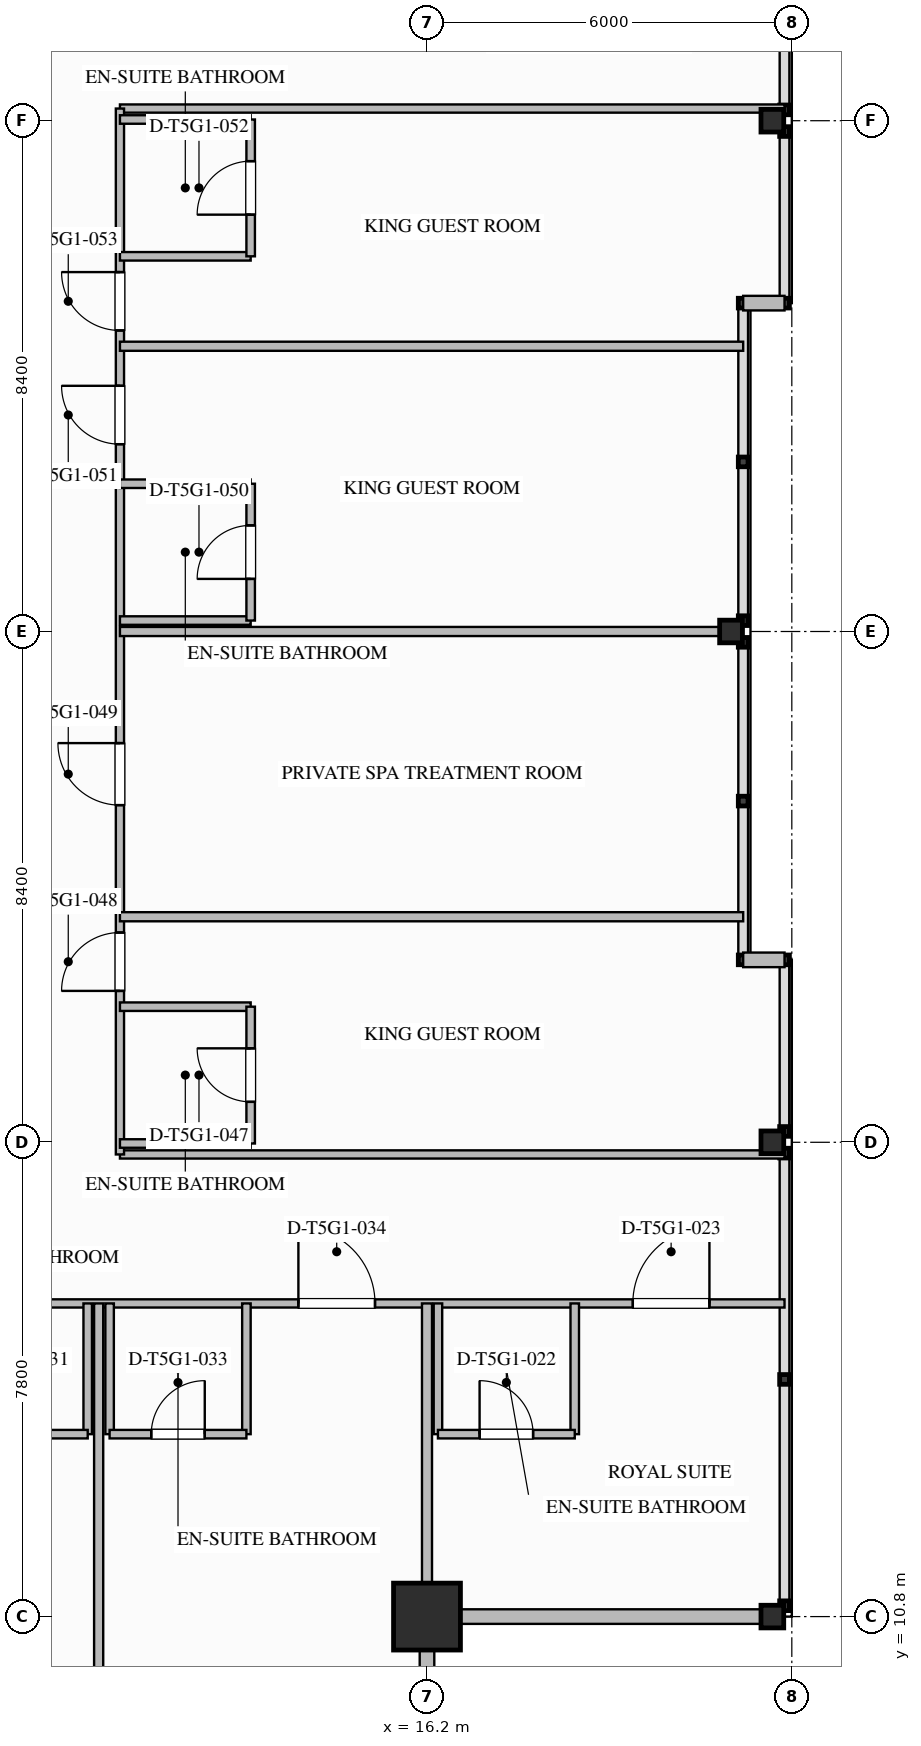
"""IFC4 building model, lengths in metres.
Left out: names, types, materials, properties, quantities, classifications, styles, units other than length and angle.
Written with IfcOpenShell. Run it as: python <this file> out.ifc"""

import sys

from ifc_helpers import new_model, si_unit, direction, frame, frame_2d, origin, origin_2d, place, context, subcontext, project, spatial, rectangle, i_section, extrude, element, fill, save


model = new_model("IFC4")
c1 = context("Model", 3, precision=1e-05, world=origin(), true_north=direction((0.0, 1.0)))
c2 = subcontext(c1, "Body", "Model", "MODEL_VIEW")
j1 = project(units=[si_unit("LENGTHUNIT", "METRE"), si_unit("PLANEANGLEUNIT", "RADIAN")], contexts=[c1])
p1 = place(None, origin())
s1 = spatial("IfcSite", under=j1, at=p1, CompositionType="ELEMENT")
p2 = place(p1, origin())
s2 = spatial("IfcBuilding", under=s1, at=p2, CompositionType="ELEMENT")
p3 = place(p2, frame((0.0, 0.0, 268.65)))
s3 = spatial("IfcBuildingStorey", under=s2, at=p3, CompositionType="ELEMENT", Elevation=268.65)
p4 = place(p3, frame((16.2, 10.8, 0.0), z_axis=(0.0, 0.0, 1.0), x_axis=(1.0, 0.0, 0.0)))
e1 = element("IfcColumn", 1, at=p4, inside=s3, PredefinedType="COLUMN", context=c2, shape_type="SweptSolid", body=[
    extrude(rectangle(XDim=1.1, YDim=1.1, at=origin_2d()), origin(), (0.0, 0.0, 1.0), 3.65),
])
for number, where, z_axis, x_axis in (
    (2, (21.88, 10.8, 0.0), (0.0, 0.0, 1.0), (1.0, 0.0, 0.0)),
    (3, (21.88, 18.6, 0.0), (0.0, 0.0, 1.0), (1.0, 0.0, 0.0)),
    (4, (21.2, 27.0, 0.0), (0.0, 0.0, 1.0), (1.0, 0.0, 0.0)),
    (5, (21.88, 35.4, 0.0), (0.0, 0.0, 1.0), (1.0, 0.0, 0.0)),
):
    element("IfcColumn", number, at=place(p3, frame(where, z_axis=z_axis, x_axis=x_axis)), inside=s3, PredefinedType="COLUMN", context=c2, shape_type="SweptSolid", body=[
        extrude(i_section(OverallWidth=0.374, OverallDepth=0.372, WebThickness=0.016, FlangeThickness=0.026, FilletRadius=0.025, at=origin_2d()), origin(), (0.0, 0.0, 1.0), 3.647),
    ])
for number, where, z_axis, x_axis in (
    (6, (22.08, 10.8, 0.0), (0.0, 0.0, 1.0), (-1.0, 0.0, 0.0)),
    (7, (16.2, 10.8, 0.0), (0.0, 0.0, 1.0), (0.0, -1.0, 0.0)),
):
    element("IfcWall", number, at=place(p3, frame(where, z_axis=z_axis, x_axis=x_axis)), inside=s3, PredefinedType="STANDARD", context=c2, shape_type="SweptSolid", body=[
        extrude(rectangle(XDim=5.88, YDim=0.24, at=frame_2d((2.94, 0.0))), origin(), (0.0, 0.0, 1.0), 2.779),
    ])
for number, where, z_axis, x_axis in (
    (8, (22.08, 32.4, 0.0), (0.0, 0.0, 1.0), (-1.0, 0.0, 0.0)),
    (9, (21.4, 21.6, 0.0), (0.0, 0.0, 1.0), (1.0, 0.0, 0.0)),
):
    element("IfcWall", number, at=place(p3, frame(where, z_axis=z_axis, x_axis=x_axis)), inside=s3, PredefinedType="STANDARD", context=c2, shape_type="SweptSolid", body=[
        extrude(rectangle(XDim=0.68, YDim=0.24, at=frame_2d((0.34, 0.0))), origin(), (0.0, 0.0, 1.0), 3.39),
    ])
p5 = place(p3, frame((-16.2, 15.95, 0.0), z_axis=(0.0, 0.0, 1.0), x_axis=(1.0, 0.0, 0.0)))
e10 = element("IfcWall", 10, at=p5, inside=s3, PredefinedType="PARTITIONING", context=c2, shape_type="SweptSolid", body=[
    extrude(rectangle(XDim=38.28, YDim=0.135, at=frame_2d((19.14, 0.0))), origin(), (0.0, 0.0, 1.0), 3.39),
])
p6 = place(p5, frame((35.785, 0.0, 0.0)))
e11 = element("IfcOpeningElement", 11, at=p6, cuts=e10, PredefinedType="OPENING", context=c2, shape_type="SweptSolid", body=[
    extrude(rectangle(XDim=1.26, YDim=2.2, at=frame_2d((0.63, 1.1))), frame((0.0, 0.077, 0.0), z_axis=(0.0, -1.0, 0.0), x_axis=(1.0, 0.0, 0.0)), (0.0, 0.0, 1.0), 0.155),
])
p7 = place(p5, frame((3.285, 0.0, 0.0)))
e12 = element("IfcOpeningElement", 12, at=p7, cuts=e10, PredefinedType="OPENING", context=c2, shape_type="SweptSolid", body=[
    extrude(rectangle(XDim=1.26, YDim=2.2, at=frame_2d((0.63, 1.1))), frame((0.0, 0.077, 0.0), z_axis=(0.0, -1.0, 0.0), x_axis=(1.0, 0.0, 0.0)), (0.0, 0.0, 1.0), 0.155),
])
p8 = place(p5, frame((7.335, 0.0, 0.0)))
e13 = element("IfcOpeningElement", 13, at=p8, cuts=e10, PredefinedType="OPENING", context=c2, shape_type="SweptSolid", body=[
    extrude(rectangle(XDim=1.26, YDim=2.2, at=frame_2d((0.63, 1.1))), frame((0.0, 0.077, 0.0), z_axis=(0.0, -1.0, 0.0), x_axis=(1.0, 0.0, 0.0)), (0.0, 0.0, 1.0), 0.155),
])
p9 = place(p5, frame((15.69, 0.0, 0.0)))
e14 = element("IfcOpeningElement", 14, at=p9, cuts=e10, PredefinedType="OPENING", context=c2, shape_type="SweptSolid", body=[
    extrude(rectangle(XDim=1.02, YDim=2.15, at=frame_2d((0.51, 1.075))), frame((0.0, 0.077, 0.0), z_axis=(0.0, -1.0, 0.0), x_axis=(1.0, 0.0, 0.0)), (0.0, 0.0, 1.0), 0.155),
])
p10 = place(p5, frame((21.375, 0.0, 0.0)))
e15 = element("IfcOpeningElement", 15, at=p10, cuts=e10, PredefinedType="OPENING", context=c2, shape_type="SweptSolid", body=[
    extrude(rectangle(XDim=1.26, YDim=2.2, at=frame_2d((0.63, 1.1))), frame((0.0, 0.077, 0.0), z_axis=(0.0, -1.0, 0.0), x_axis=(1.0, 0.0, 0.0)), (0.0, 0.0, 1.0), 0.155),
])
p11 = place(p5, frame((30.285, 0.0, 0.0)))
e16 = element("IfcOpeningElement", 16, at=p11, cuts=e10, PredefinedType="OPENING", context=c2, shape_type="SweptSolid", body=[
    extrude(rectangle(XDim=1.26, YDim=2.2, at=frame_2d((0.63, 1.1))), frame((0.0, 0.077, 0.0), z_axis=(0.0, -1.0, 0.0), x_axis=(1.0, 0.0, 0.0)), (0.0, 0.0, 1.0), 0.155),
])
for number, where, z_axis, x_axis in (
    (17, (11.15, 18.4, 0.0), (0.0, 0.0, 1.0), (1.0, 0.0, 0.0)),
    (18, (11.15, 35.6, 0.0), (0.0, 0.0, 1.0), (1.0, 0.0, 0.0)),
):
    element("IfcWall", number, at=place(p3, frame(where, z_axis=z_axis, x_axis=x_axis)), inside=s3, PredefinedType="PARTITIONING", context=c2, shape_type="SweptSolid", body=[
        extrude(rectangle(XDim=10.93, YDim=0.135, at=frame_2d((5.465, 0.0))), origin(), (0.0, 0.0, 1.0), 2.768),
    ])
p12 = place(p3, frame((11.15, 18.4, 0.0), z_axis=(0.0, 0.0, 1.0), x_axis=(0.0, 1.0, 0.0)))
e19 = element("IfcWall", 19, at=p12, inside=s3, PredefinedType="PARTITIONING", context=c2, shape_type="SweptSolid", body=[
    extrude(rectangle(XDim=17.2, YDim=0.135, at=frame_2d((8.6, 0.0))), origin(), (0.0, 0.0, 1.0), 3.39),
])
p13 = place(p12, frame((2.689, 0.0, 0.0)))
e20 = element("IfcOpeningElement", 20, at=p13, cuts=e19, PredefinedType="OPENING", context=c2, shape_type="SweptSolid", body=[
    extrude(rectangle(XDim=0.96, YDim=2.15, at=frame_2d((0.48, 1.075))), frame((0.0, 0.077, 0.0), z_axis=(0.0, -1.0, 0.0), x_axis=(1.0, 0.0, 0.0)), (0.0, 0.0, 1.0), 0.155),
])
p14 = place(p12, frame((5.745, 0.0, 0.0)))
e21 = element("IfcOpeningElement", 21, at=p14, cuts=e19, PredefinedType="OPENING", context=c2, shape_type="SweptSolid", body=[
    extrude(rectangle(XDim=1.02, YDim=2.15, at=frame_2d((0.51, 1.075))), frame((0.0, 0.077, 0.0), z_axis=(0.0, -1.0, 0.0), x_axis=(1.0, 0.0, 0.0)), (0.0, 0.0, 1.0), 0.155),
])
p15 = place(p12, frame((11.68, 0.0, 0.0)))
e22 = element("IfcOpeningElement", 22, at=p15, cuts=e19, PredefinedType="OPENING", context=c2, shape_type="SweptSolid", body=[
    extrude(rectangle(XDim=0.96, YDim=2.15, at=frame_2d((0.48, 1.075))), frame((0.0, 0.077, 0.0), z_axis=(0.0, -1.0, 0.0), x_axis=(1.0, 0.0, 0.0)), (0.0, 0.0, 1.0), 0.155),
])
p16 = place(p12, frame((13.551, 0.0, 0.0)))
e23 = element("IfcOpeningElement", 23, at=p16, cuts=e19, PredefinedType="OPENING", context=c2, shape_type="SweptSolid", body=[
    extrude(rectangle(XDim=0.96, YDim=2.15, at=frame_2d((0.48, 1.075))), frame((0.0, 0.077, 0.0), z_axis=(0.0, -1.0, 0.0), x_axis=(1.0, 0.0, 0.0)), (0.0, 0.0, 1.0), 0.155),
])
p17 = place(p3, frame((16.2, 10.92, 0.0), z_axis=(0.0, 0.0, 1.0), x_axis=(0.0, 1.0, 0.0)))
e24 = element("IfcWall", 24, at=p17, inside=s3, PredefinedType="PARTITIONING", context=c2, shape_type="SweptSolid", body=[
    extrude(rectangle(XDim=5.03, YDim=0.165, at=frame_2d((2.515, 0.0))), origin(), (0.0, 0.0, 1.0), 2.764),
])
p18 = place(p3, frame((16.38, 15.95, 0.0), z_axis=(0.0, 0.0, 1.0), x_axis=(0.0, -1.0, 0.0)))
e25 = element("IfcWall", 25, at=p18, inside=s3, PredefinedType="PLUMBINGWALL", context=c2, shape_type="SweptSolid", body=[
    extrude(rectangle(XDim=2.15, YDim=0.14, at=frame_2d((1.075, 0.0))), origin(), (0.0, 0.0, 1.0), 2.764),
])
p19 = place(p3, frame((18.63, 15.95, 0.0), z_axis=(0.0, 0.0, 1.0), x_axis=(0.0, -1.0, 0.0)))
e26 = element("IfcWall", 26, at=p19, inside=s3, PredefinedType="PLUMBINGWALL", context=c2, shape_type="SweptSolid", body=[
    extrude(rectangle(XDim=2.15, YDim=0.14, at=frame_2d((1.075, 0.0))), origin(), (0.0, 0.0, 1.0), 3.39),
])
p20 = place(p3, frame((16.38, 13.8, 0.0), z_axis=(0.0, 0.0, 1.0), x_axis=(1.0, 0.0, 0.0)))
e27 = element("IfcWall", 27, at=p20, inside=s3, PredefinedType="PLUMBINGWALL", context=c2, shape_type="SweptSolid", body=[
    extrude(rectangle(XDim=2.25, YDim=0.14, at=frame_2d((1.125, 0.0))), origin(), (0.0, 0.0, 1.0), 3.39),
])
p21 = place(p20, frame((0.685, 0.0, 0.0)))
e28 = element("IfcOpeningElement", 28, at=p21, cuts=e27, PredefinedType="OPENING", context=c2, shape_type="SweptSolid", body=[
    extrude(rectangle(XDim=0.88, YDim=2.1, at=frame_2d((0.44, 1.05))), frame((0.0, 0.08, 0.0), z_axis=(0.0, -1.0, 0.0), x_axis=(1.0, 0.0, 0.0)), (0.0, 0.0, 1.0), 0.16),
])
p22 = place(p3, frame((10.62, 15.95, 0.0), z_axis=(0.0, 0.0, 1.0), x_axis=(0.0, -1.0, 0.0)))
e29 = element("IfcWall", 29, at=p22, inside=s3, PredefinedType="PLUMBINGWALL", context=c2, shape_type="SweptSolid", body=[
    extrude(rectangle(XDim=2.15, YDim=0.14, at=frame_2d((1.075, 0.0))), origin(), (0.0, 0.0, 1.0), 3.39),
])
p23 = place(p3, frame((8.37, 13.8, 0.0), z_axis=(0.0, 0.0, 1.0), x_axis=(1.0, 0.0, 0.0)))
e30 = element("IfcWall", 30, at=p23, inside=s3, PredefinedType="PLUMBINGWALL", context=c2, shape_type="SweptSolid", body=[
    extrude(rectangle(XDim=2.25, YDim=0.14, at=frame_2d((1.125, 0.0))), origin(), (0.0, 0.0, 1.0), 3.39),
])
p24 = place(p23, frame((0.685, 0.0, 0.0)))
e31 = element("IfcOpeningElement", 31, at=p24, cuts=e30, PredefinedType="OPENING", context=c2, shape_type="SweptSolid", body=[
    extrude(rectangle(XDim=0.88, YDim=2.1, at=frame_2d((0.44, 1.05))), frame((0.0, 0.08, 0.0), z_axis=(0.0, -1.0, 0.0), x_axis=(1.0, 0.0, 0.0)), (0.0, 0.0, 1.0), 0.16),
])
p25 = place(p3, frame((10.8, 4.92, 0.0), z_axis=(0.0, 0.0, 1.0), x_axis=(0.0, 1.0, 0.0)))
e32 = element("IfcWall", 32, at=p25, inside=s3, PredefinedType="PARTITIONING", context=c2, shape_type="SweptSolid", body=[
    extrude(rectangle(XDim=11.03, YDim=0.15, at=frame_2d((5.515, 0.0))), origin(), (0.0, 0.0, 1.0), 3.39),
])
for number, where, z_axis, x_axis in (
    (33, (10.98, 15.95, 0.0), (0.0, 0.0, 1.0), (0.0, -1.0, 0.0)),
    (34, (13.23, 15.95, 0.0), (0.0, 0.0, 1.0), (0.0, -1.0, 0.0)),
):
    element("IfcWall", number, at=place(p3, frame(where, z_axis=z_axis, x_axis=x_axis)), inside=s3, PredefinedType="PLUMBINGWALL", context=c2, shape_type="SweptSolid", body=[
        extrude(rectangle(XDim=2.15, YDim=0.14, at=frame_2d((1.075, 0.0))), origin(), (0.0, 0.0, 1.0), 3.39),
    ])
p26 = place(p3, frame((10.98, 13.8, 0.0), z_axis=(0.0, 0.0, 1.0), x_axis=(1.0, 0.0, 0.0)))
e35 = element("IfcWall", 35, at=p26, inside=s3, PredefinedType="PLUMBINGWALL", context=c2, shape_type="SweptSolid", body=[
    extrude(rectangle(XDim=2.25, YDim=0.14, at=frame_2d((1.125, 0.0))), origin(), (0.0, 0.0, 1.0), 3.39),
])
p27 = place(p26, frame((0.685, 0.0, 0.0)))
e36 = element("IfcOpeningElement", 36, at=p27, cuts=e35, PredefinedType="OPENING", context=c2, shape_type="SweptSolid", body=[
    extrude(rectangle(XDim=0.88, YDim=2.1, at=frame_2d((0.44, 1.05))), frame((0.0, 0.08, 0.0), z_axis=(0.0, -1.0, 0.0), x_axis=(1.0, 0.0, 0.0)), (0.0, 0.0, 1.0), 0.16),
])
p28 = place(p3, frame((11.15, 18.58, 0.0), z_axis=(0.0, 0.0, 1.0), x_axis=(1.0, 0.0, 0.0)))
e37 = element("IfcWall", 37, at=p28, inside=s3, PredefinedType="PLUMBINGWALL", context=c2, shape_type="SweptSolid", body=[
    extrude(rectangle(XDim=2.15, YDim=0.14, at=frame_2d((1.075, 0.0))), origin(), (0.0, 0.0, 1.0), 2.768),
])
p29 = place(p3, frame((11.15, 20.83, 0.0), z_axis=(0.0, 0.0, 1.0), x_axis=(1.0, 0.0, 0.0)))
e38 = element("IfcWall", 38, at=p29, inside=s3, PredefinedType="PLUMBINGWALL", context=c2, shape_type="SweptSolid", body=[
    extrude(rectangle(XDim=2.15, YDim=0.14, at=frame_2d((1.075, 0.0))), origin(), (0.0, 0.0, 1.0), 3.39),
])
p30 = place(p3, frame((13.3, 18.58, 0.0), z_axis=(0.0, 0.0, 1.0), x_axis=(0.0, 1.0, 0.0)))
e39 = element("IfcWall", 39, at=p30, inside=s3, PredefinedType="PLUMBINGWALL", context=c2, shape_type="SweptSolid", body=[
    extrude(rectangle(XDim=2.25, YDim=0.14, at=frame_2d((1.125, 0.0))), origin(), (0.0, 0.0, 1.0), 3.39),
])
p31 = place(p30, frame((0.685, 0.0, 0.0)))
e40 = element("IfcOpeningElement", 40, at=p31, cuts=e39, PredefinedType="OPENING", context=c2, shape_type="SweptSolid", body=[
    extrude(rectangle(XDim=0.88, YDim=2.1, at=frame_2d((0.44, 1.05))), frame((0.0, 0.08, 0.0), z_axis=(0.0, -1.0, 0.0), x_axis=(1.0, 0.0, 0.0)), (0.0, 0.0, 1.0), 0.16),
])
p32 = place(p3, frame((11.15, 22.309, 0.0), z_axis=(0.0, 0.0, 1.0), x_axis=(1.0, 0.0, 0.0)))
e41 = element("IfcWall", 41, at=p32, inside=s3, PredefinedType="PARTITIONING", context=c2, shape_type="SweptSolid", body=[
    extrude(rectangle(XDim=10.25, YDim=0.15, at=frame_2d((5.125, 0.0))), origin(), (0.0, 0.0, 1.0), 3.39),
])
p33 = place(p3, frame((11.15, 27.0, 0.0), z_axis=(0.0, 0.0, 1.0), x_axis=(1.0, 0.0, 0.0)))
e42 = element("IfcWall", 42, at=p33, inside=s3, PredefinedType="PARTITIONING", context=c2, shape_type="SweptSolid", body=[
    extrude(rectangle(XDim=10.25, YDim=0.15, at=frame_2d((5.125, 0.0))), origin(), (0.0, 0.0, 1.0), 2.768),
])
p34 = place(p3, frame((11.15, 27.18, 0.0), z_axis=(0.0, 0.0, 1.0), x_axis=(1.0, 0.0, 0.0)))
e43 = element("IfcWall", 43, at=p34, inside=s3, PredefinedType="PLUMBINGWALL", context=c2, shape_type="SweptSolid", body=[
    extrude(rectangle(XDim=2.15, YDim=0.14, at=frame_2d((1.075, 0.0))), origin(), (0.0, 0.0, 1.0), 2.768),
])
p35 = place(p3, frame((11.15, 29.43, 0.0), z_axis=(0.0, 0.0, 1.0), x_axis=(1.0, 0.0, 0.0)))
e44 = element("IfcWall", 44, at=p35, inside=s3, PredefinedType="PLUMBINGWALL", context=c2, shape_type="SweptSolid", body=[
    extrude(rectangle(XDim=2.15, YDim=0.14, at=frame_2d((1.075, 0.0))), origin(), (0.0, 0.0, 1.0), 3.39),
])
p36 = place(p3, frame((13.3, 27.18, 0.0), z_axis=(0.0, 0.0, 1.0), x_axis=(0.0, 1.0, 0.0)))
e45 = element("IfcWall", 45, at=p36, inside=s3, PredefinedType="PLUMBINGWALL", context=c2, shape_type="SweptSolid", body=[
    extrude(rectangle(XDim=2.25, YDim=0.14, at=frame_2d((1.125, 0.0))), origin(), (0.0, 0.0, 1.0), 3.39),
])
p37 = place(p36, frame((0.685, 0.0, 0.0)))
e46 = element("IfcOpeningElement", 46, at=p37, cuts=e45, PredefinedType="OPENING", context=c2, shape_type="SweptSolid", body=[
    extrude(rectangle(XDim=0.88, YDim=2.1, at=frame_2d((0.44, 1.05))), frame((0.0, 0.08, 0.0), z_axis=(0.0, -1.0, 0.0), x_axis=(1.0, 0.0, 0.0)), (0.0, 0.0, 1.0), 0.16),
])
p38 = place(p3, frame((11.15, 31.691, 0.0), z_axis=(0.0, 0.0, 1.0), x_axis=(1.0, 0.0, 0.0)))
e47 = element("IfcWall", 47, at=p38, inside=s3, PredefinedType="PARTITIONING", context=c2, shape_type="SweptSolid", body=[
    extrude(rectangle(XDim=10.25, YDim=0.15, at=frame_2d((5.125, 0.0))), origin(), (0.0, 0.0, 1.0), 3.39),
])
p39 = place(p3, frame((11.15, 33.17, 0.0), z_axis=(0.0, 0.0, 1.0), x_axis=(1.0, 0.0, 0.0)))
e48 = element("IfcWall", 48, at=p39, inside=s3, PredefinedType="PLUMBINGWALL", context=c2, shape_type="SweptSolid", body=[
    extrude(rectangle(XDim=2.15, YDim=0.14, at=frame_2d((1.075, 0.0))), origin(), (0.0, 0.0, 1.0), 3.39),
])
p40 = place(p3, frame((11.15, 35.42, 0.0), z_axis=(0.0, 0.0, 1.0), x_axis=(1.0, 0.0, 0.0)))
e49 = element("IfcWall", 49, at=p40, inside=s3, PredefinedType="PLUMBINGWALL", context=c2, shape_type="SweptSolid", body=[
    extrude(rectangle(XDim=2.15, YDim=0.14, at=frame_2d((1.075, 0.0))), origin(), (0.0, 0.0, 1.0), 2.768),
])
p41 = place(p3, frame((13.3, 33.17, 0.0), z_axis=(0.0, 0.0, 1.0), x_axis=(0.0, 1.0, 0.0)))
e50 = element("IfcWall", 50, at=p41, inside=s3, PredefinedType="PLUMBINGWALL", context=c2, shape_type="SweptSolid", body=[
    extrude(rectangle(XDim=2.25, YDim=0.14, at=frame_2d((1.125, 0.0))), origin(), (0.0, 0.0, 1.0), 3.39),
])
p42 = place(p41, frame((0.685, 0.0, 0.0)))
e51 = element("IfcOpeningElement", 51, at=p42, cuts=e50, PredefinedType="OPENING", context=c2, shape_type="SweptSolid", body=[
    extrude(rectangle(XDim=0.88, YDim=2.1, at=frame_2d((0.44, 1.05))), frame((0.0, 0.08, 0.0), z_axis=(0.0, -1.0, 0.0), x_axis=(1.0, 0.0, 0.0)), (0.0, 0.0, 1.0), 0.16),
])
p43 = place(p21, origin())
e52 = element("IfcDoor", 52, at=p43, inside=s3, OperationType="SINGLE_SWING_LEFT", PredefinedType="DOOR", context=c2, shape_type="SweptSolid", body=[
    extrude(rectangle(XDim=0.88, YDim=2.1, at=frame_2d((0.44, 1.05))), frame((0.0, 0.025, 0.0), z_axis=(0.0, -1.0, 0.0), x_axis=(1.0, 0.0, 0.0)), (0.0, 0.0, 1.0), 0.05),
])
fill(e28, e52)
p44 = place(p6, origin())
e53 = element("IfcDoor", 53, at=p44, inside=s3, OperationType="SINGLE_SWING_RIGHT", PredefinedType="DOOR", context=c2, shape_type="SweptSolid", body=[
    extrude(rectangle(XDim=1.26, YDim=2.2, at=frame_2d((0.63, 1.1))), frame((0.0, 0.025, 0.0), z_axis=(0.0, -1.0, 0.0), x_axis=(1.0, 0.0, 0.0)), (0.0, 0.0, 1.0), 0.05),
])
fill(e11, e53)
p45 = place(p27, origin())
e54 = element("IfcDoor", 54, at=p45, inside=s3, OperationType="SINGLE_SWING_RIGHT", PredefinedType="DOOR", context=c2, shape_type="SweptSolid", body=[
    extrude(rectangle(XDim=0.88, YDim=2.1, at=frame_2d((0.44, 1.05))), frame((0.0, 0.025, 0.0), z_axis=(0.0, -1.0, 0.0), x_axis=(1.0, 0.0, 0.0)), (0.0, 0.0, 1.0), 0.05),
])
fill(e36, e54)
p46 = place(p11, origin())
e55 = element("IfcDoor", 55, at=p46, inside=s3, OperationType="SINGLE_SWING_LEFT", PredefinedType="DOOR", context=c2, shape_type="SweptSolid", body=[
    extrude(rectangle(XDim=1.26, YDim=2.2, at=frame_2d((0.63, 1.1))), frame((0.0, 0.025, 0.0), z_axis=(0.0, -1.0, 0.0), x_axis=(1.0, 0.0, 0.0)), (0.0, 0.0, 1.0), 0.05),
])
fill(e16, e55)
p47 = place(p31, origin())
e56 = element("IfcDoor", 56, at=p47, inside=s3, OperationType="SINGLE_SWING_RIGHT", PredefinedType="DOOR", context=c2, shape_type="SweptSolid", body=[
    extrude(rectangle(XDim=0.88, YDim=2.1, at=frame_2d((0.44, 1.05))), frame((0.0, 0.025, 0.0), z_axis=(0.0, -1.0, 0.0), x_axis=(1.0, 0.0, 0.0)), (0.0, 0.0, 1.0), 0.05),
])
fill(e40, e56)
p48 = place(p13, origin())
e57 = element("IfcDoor", 57, at=p48, inside=s3, OperationType="SINGLE_SWING_LEFT", PredefinedType="DOOR", context=c2, shape_type="SweptSolid", body=[
    extrude(rectangle(XDim=0.96, YDim=2.15, at=frame_2d((0.48, 1.075))), frame((0.0, 0.025, 0.0), z_axis=(0.0, -1.0, 0.0), x_axis=(1.0, 0.0, 0.0)), (0.0, 0.0, 1.0), 0.05),
])
fill(e20, e57)
p49 = place(p14, origin())
e58 = element("IfcDoor", 58, at=p49, inside=s3, OperationType="SINGLE_SWING_RIGHT", PredefinedType="DOOR", context=c2, shape_type="SweptSolid", body=[
    extrude(rectangle(XDim=1.02, YDim=2.15, at=frame_2d((0.51, 1.075))), frame((0.0, 0.025, 0.0), z_axis=(0.0, -1.0, 0.0), x_axis=(1.0, 0.0, 0.0)), (0.0, 0.0, 1.0), 0.05),
])
fill(e21, e58)
p50 = place(p37, origin())
e59 = element("IfcDoor", 59, at=p50, inside=s3, OperationType="SINGLE_SWING_LEFT", PredefinedType="DOOR", context=c2, shape_type="SweptSolid", body=[
    extrude(rectangle(XDim=0.88, YDim=2.1, at=frame_2d((0.44, 1.05))), frame((0.0, 0.025, 0.0), z_axis=(0.0, -1.0, 0.0), x_axis=(1.0, 0.0, 0.0)), (0.0, 0.0, 1.0), 0.05),
])
fill(e46, e59)
p51 = place(p15, origin())
e60 = element("IfcDoor", 60, at=p51, inside=s3, OperationType="SINGLE_SWING_RIGHT", PredefinedType="DOOR", context=c2, shape_type="SweptSolid", body=[
    extrude(rectangle(XDim=0.96, YDim=2.15, at=frame_2d((0.48, 1.075))), frame((0.0, 0.025, 0.0), z_axis=(0.0, -1.0, 0.0), x_axis=(1.0, 0.0, 0.0)), (0.0, 0.0, 1.0), 0.05),
])
fill(e22, e60)
p52 = place(p42, origin())
e61 = element("IfcDoor", 61, at=p52, inside=s3, OperationType="SINGLE_SWING_LEFT", PredefinedType="DOOR", context=c2, shape_type="SweptSolid", body=[
    extrude(rectangle(XDim=0.88, YDim=2.1, at=frame_2d((0.44, 1.05))), frame((0.0, 0.025, 0.0), z_axis=(0.0, -1.0, 0.0), x_axis=(1.0, 0.0, 0.0)), (0.0, 0.0, 1.0), 0.05),
])
fill(e51, e61)
p53 = place(p16, origin())
e62 = element("IfcDoor", 62, at=p53, inside=s3, OperationType="SINGLE_SWING_RIGHT", PredefinedType="DOOR", context=c2, shape_type="SweptSolid", body=[
    extrude(rectangle(XDim=0.96, YDim=2.15, at=frame_2d((0.48, 1.075))), frame((0.0, 0.025, 0.0), z_axis=(0.0, -1.0, 0.0), x_axis=(1.0, 0.0, 0.0)), (0.0, 0.0, 1.0), 0.05),
])
fill(e23, e62)
save(model, sys.argv[1])
